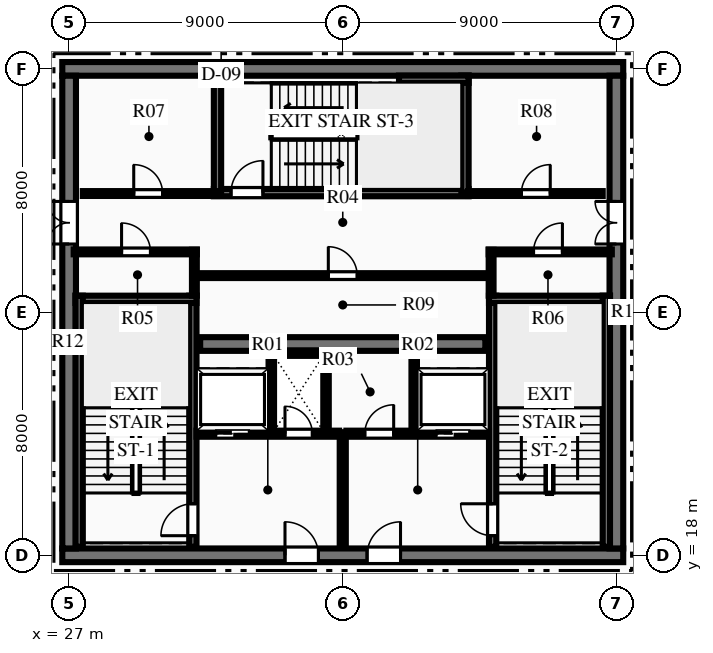
"""IFC4 building model, lengths in metres.
Left out: names, types, materials, properties, quantities, classifications, styles, units other than length and angle.
Written with IfcOpenShell. Run it as: python <this file> out.ifc"""

import sys

from ifc_helpers import new_model, si_unit, direction, frame, frame_2d, origin, place, context, subcontext, project, spatial, rectangle, extrude, element, fill, save


model = new_model("IFC4")
c1 = context("Model", 3, precision=1e-05, world=origin(), true_north=direction((0.0, 1.0)))
c2 = subcontext(c1, "Body", "Model", "MODEL_VIEW")
j1 = project(units=[si_unit("LENGTHUNIT", "METRE"), si_unit("PLANEANGLEUNIT", "RADIAN")], contexts=[c1])
p1 = place(None, origin())
s1 = spatial("IfcSite", under=j1, at=p1, CompositionType="ELEMENT")
p2 = place(p1, origin())
s2 = spatial("IfcBuilding", under=s1, at=p2, CompositionType="ELEMENT")
p3 = place(p2, frame((0.0, 0.0, 360.6)))
s3 = spatial("IfcBuildingStorey", under=s2, at=p3, CompositionType="ELEMENT", Elevation=360.6)
p4 = place(p3, frame((26.775, 18.0, 0.0), z_axis=(0.0, 0.0, 1.0), x_axis=(1.0, 0.0, 0.0)))
e1 = element("IfcWall", 1, at=p4, inside=s3, PredefinedType="SHEAR", context=c2, shape_type="SweptSolid", body=[
    extrude(rectangle(XDim=18.45, YDim=0.45, at=frame_2d((9.225, 0.0))), origin(), (0.0, 0.0, 1.0), 3.6),
])
p5 = place(p4, frame((7.325, 0.0, 0.0)))
e2 = element("IfcOpeningElement", 2, at=p5, cuts=e1, PredefinedType="OPENING", context=c2, shape_type="SweptSolid", body=[
    extrude(rectangle(XDim=1.1, YDim=2.15, at=frame_2d((0.55, 1.075))), frame((0.0, 0.235, 0.0), z_axis=(0.0, -1.0, 0.0), x_axis=(1.0, 0.0, 0.0)), (0.0, 0.0, 1.0), 0.47),
])
p6 = place(p4, frame((10.025, 0.0, 0.0)))
e3 = element("IfcOpeningElement", 3, at=p6, cuts=e1, PredefinedType="OPENING", context=c2, shape_type="SweptSolid", body=[
    extrude(rectangle(XDim=1.1, YDim=2.15, at=frame_2d((0.55, 1.075))), frame((0.0, 0.235, 0.0), z_axis=(0.0, -1.0, 0.0), x_axis=(1.0, 0.0, 0.0)), (0.0, 0.0, 1.0), 0.47),
])
p7 = place(p3, frame((26.775, 34.0, 0.0), z_axis=(0.0, 0.0, 1.0), x_axis=(1.0, 0.0, 0.0)))
e4 = element("IfcWall", 4, at=p7, inside=s3, PredefinedType="SHEAR", context=c2, shape_type="SweptSolid", body=[
    extrude(rectangle(XDim=18.45, YDim=0.45, at=frame_2d((9.225, 0.0))), origin(), (0.0, 0.0, 1.0), 3.6),
])
p8 = place(p3, frame((27.0, 18.225, 0.0), z_axis=(0.0, 0.0, 1.0), x_axis=(0.0, 1.0, 0.0)))
e5 = element("IfcWall", 5, at=p8, inside=s3, PredefinedType="SHEAR", context=c2, shape_type="SweptSolid", body=[
    extrude(rectangle(XDim=15.55, YDim=0.45, at=frame_2d((7.775, 0.0))), origin(), (0.0, 0.0, 1.0), 3.6),
])
p9 = place(p8, frame((10.015, 0.0, 0.0)))
e6 = element("IfcOpeningElement", 6, at=p9, cuts=e5, PredefinedType="OPENING", context=c2, shape_type="SweptSolid", body=[
    extrude(rectangle(XDim=1.4, YDim=2.2, at=frame_2d((0.7, 1.1))), frame((0.0, 0.235, 0.0), z_axis=(0.0, -1.0, 0.0), x_axis=(1.0, 0.0, 0.0)), (0.0, 0.0, 1.0), 0.47),
])
p10 = place(p3, frame((45.0, 18.225, 0.0), z_axis=(0.0, 0.0, 1.0), x_axis=(0.0, 1.0, 0.0)))
e7 = element("IfcWall", 7, at=p10, inside=s3, PredefinedType="SHEAR", context=c2, shape_type="SweptSolid", body=[
    extrude(rectangle(XDim=15.55, YDim=0.45, at=frame_2d((7.775, 0.0))), origin(), (0.0, 0.0, 1.0), 3.6),
])
p11 = place(p10, frame((10.015, 0.0, 0.0)))
e8 = element("IfcOpeningElement", 8, at=p11, cuts=e7, PredefinedType="OPENING", context=c2, shape_type="SweptSolid", body=[
    extrude(rectangle(XDim=1.4, YDim=2.2, at=frame_2d((0.7, 1.1))), frame((0.0, 0.235, 0.0), z_axis=(0.0, -1.0, 0.0), x_axis=(1.0, 0.0, 0.0)), (0.0, 0.0, 1.0), 0.47),
])
p12 = place(p3, frame((31.31, 24.95, 0.0), z_axis=(0.0, 0.0, 1.0), x_axis=(1.0, 0.0, 0.0)))
e9 = element("IfcWall", 9, at=p12, inside=s3, PredefinedType="SHEAR", context=c2, shape_type="SweptSolid", body=[
    extrude(rectangle(XDim=9.38, YDim=0.45, at=frame_2d((4.69, 0.0))), origin(), (0.0, 0.0, 1.0), 3.6),
])
p13 = place(p3, frame((31.07, 18.28, 0.0), z_axis=(0.0, 0.0, 1.0), x_axis=(0.0, 1.0, 0.0)))
e10 = element("IfcWall", 10, at=p13, inside=s3, PredefinedType="SHEAR", context=c2, shape_type="SweptSolid", body=[
    extrude(rectangle(XDim=8.26, YDim=0.24, at=frame_2d((4.13, 0.0))), origin(), (0.0, 0.0, 1.0), 3.6),
])
p14 = place(p13, frame((0.365, 0.0, 0.0)))
e11 = element("IfcOpeningElement", 11, at=p14, cuts=e10, PredefinedType="OPENING", context=c2, shape_type="SweptSolid", body=[
    extrude(rectangle(XDim=1.05, YDim=2.15, at=frame_2d((0.525, 1.075))), frame((0.0, 0.13, 0.0), z_axis=(0.0, -1.0, 0.0), x_axis=(1.0, 0.0, 0.0)), (0.0, 0.0, 1.0), 0.26),
])
p15 = place(p3, frame((27.21, 26.42, 0.0), z_axis=(0.0, 0.0, 1.0), x_axis=(1.0, 0.0, 0.0)))
e12 = element("IfcWall", 12, at=p15, inside=s3, PredefinedType="SHEAR", context=c2, shape_type="SweptSolid", body=[
    extrude(rectangle(XDim=3.98, YDim=0.24, at=frame_2d((1.99, 0.0))), origin(), (0.0, 0.0, 1.0), 3.6),
])
p16 = place(p3, frame((27.33, 18.28, 0.0), z_axis=(0.0, 0.0, 1.0), x_axis=(0.0, 1.0, 0.0)))
e13 = element("IfcWall", 13, at=p16, inside=s3, PredefinedType="SHEAR", context=c2, shape_type="SweptSolid", body=[
    extrude(rectangle(XDim=8.26, YDim=0.24, at=frame_2d((4.13, 0.0))), origin(), (0.0, 0.0, 1.0), 3.6),
])
p17 = place(p3, frame((40.93, 18.28, 0.0), z_axis=(0.0, 0.0, 1.0), x_axis=(0.0, 1.0, 0.0)))
e14 = element("IfcWall", 14, at=p17, inside=s3, PredefinedType="SHEAR", context=c2, shape_type="SweptSolid", body=[
    extrude(rectangle(XDim=8.26, YDim=0.24, at=frame_2d((4.13, 0.0))), origin(), (0.0, 0.0, 1.0), 3.6),
])
p18 = place(p17, frame((0.365, 0.0, 0.0)))
e15 = element("IfcOpeningElement", 15, at=p18, cuts=e14, PredefinedType="OPENING", context=c2, shape_type="SweptSolid", body=[
    extrude(rectangle(XDim=1.05, YDim=2.15, at=frame_2d((0.525, 1.075))), frame((0.0, 0.13, 0.0), z_axis=(0.0, -1.0, 0.0), x_axis=(1.0, 0.0, 0.0)), (0.0, 0.0, 1.0), 0.26),
])
p19 = place(p3, frame((40.81, 26.42, 0.0), z_axis=(0.0, 0.0, 1.0), x_axis=(1.0, 0.0, 0.0)))
e16 = element("IfcWall", 16, at=p19, inside=s3, PredefinedType="SHEAR", context=c2, shape_type="SweptSolid", body=[
    extrude(rectangle(XDim=3.98, YDim=0.24, at=frame_2d((1.99, 0.0))), origin(), (0.0, 0.0, 1.0), 3.6),
])
p20 = place(p3, frame((44.67, 18.28, 0.0), z_axis=(0.0, 0.0, 1.0), x_axis=(0.0, 1.0, 0.0)))
e17 = element("IfcWall", 17, at=p20, inside=s3, PredefinedType="SHEAR", context=c2, shape_type="SweptSolid", body=[
    extrude(rectangle(XDim=8.26, YDim=0.24, at=frame_2d((4.13, 0.0))), origin(), (0.0, 0.0, 1.0), 3.6),
])
p21 = place(p3, frame((31.76, 29.93, 0.0), z_axis=(0.0, 0.0, 1.0), x_axis=(1.0, 0.0, 0.0)))
e18 = element("IfcWall", 18, at=p21, inside=s3, PredefinedType="SHEAR", context=c2, shape_type="SweptSolid", body=[
    extrude(rectangle(XDim=8.38, YDim=0.24, at=frame_2d((4.19, 0.0))), origin(), (0.0, 0.0, 1.0), 3.6),
])
p22 = place(p21, frame((0.565, 0.0, 0.0)))
e19 = element("IfcOpeningElement", 19, at=p22, cuts=e18, PredefinedType="OPENING", context=c2, shape_type="SweptSolid", body=[
    extrude(rectangle(XDim=1.05, YDim=2.15, at=frame_2d((0.525, 1.075))), frame((0.0, 0.13, 0.0), z_axis=(0.0, -1.0, 0.0), x_axis=(1.0, 0.0, 0.0)), (0.0, 0.0, 1.0), 0.26),
])
p23 = place(p3, frame((31.88, 29.93, 0.0), z_axis=(0.0, 0.0, 1.0), x_axis=(0.0, 1.0, 0.0)))
e20 = element("IfcWall", 20, at=p23, inside=s3, PredefinedType="SHEAR", context=c2, shape_type="SweptSolid", body=[
    extrude(rectangle(XDim=3.79, YDim=0.24, at=frame_2d((1.895, 0.0))), origin(), (0.0, 0.0, 1.0), 3.6),
])
p24 = place(p3, frame((40.02, 29.93, 0.0), z_axis=(0.0, 0.0, 1.0), x_axis=(0.0, 1.0, 0.0)))
e21 = element("IfcWall", 21, at=p24, inside=s3, PredefinedType="SHEAR", context=c2, shape_type="SweptSolid", body=[
    extrude(rectangle(XDim=3.85, YDim=0.24, at=frame_2d((1.925, 0.0))), origin(), (0.0, 0.0, 1.0), 3.6),
])
p25 = place(p3, frame((37.85, 33.66, 0.0), z_axis=(0.0, 0.0, 1.0), x_axis=(1.0, 0.0, 0.0)))
e22 = element("IfcWall", 22, at=p25, inside=s3, PredefinedType="SHEAR", context=c2, shape_type="SweptSolid", body=[
    extrude(rectangle(XDim=2.29, YDim=0.24, at=frame_2d((1.145, 0.0))), origin(), (0.0, 0.0, 1.0), 3.6),
])
p26 = place(p3, frame((36.0, 18.28, 0.0), z_axis=(0.0, 0.0, 1.0), x_axis=(0.0, 1.0, 0.0)))
e23 = element("IfcWall", 23, at=p26, inside=s3, PredefinedType="PARTITIONING", context=c2, shape_type="SweptSolid", body=[
    extrude(rectangle(XDim=3.77, YDim=0.2, at=frame_2d((1.885, 0.0))), origin(), (0.0, 0.0, 1.0), 3.33),
])
p27 = place(p3, frame((31.19, 22.0, 0.0), z_axis=(0.0, 0.0, 1.0), x_axis=(1.0, 0.0, 0.0)))
e24 = element("IfcWall", 24, at=p27, inside=s3, PredefinedType="PARTITIONING", context=c2, shape_type="SweptSolid", body=[
    extrude(rectangle(XDim=4.69, YDim=0.2, at=frame_2d((2.345, 0.0))), origin(), (0.0, 0.0, 1.0), 3.33),
])
p28 = place(p27, frame((2.91, 0.0, 0.0)))
e25 = element("IfcOpeningElement", 25, at=p28, cuts=e24, PredefinedType="OPENING", context=c2, shape_type="SweptSolid", body=[
    extrude(rectangle(XDim=0.9, YDim=2.15, at=frame_2d((0.45, 1.075))), frame((0.0, 0.11, 0.0), z_axis=(0.0, -1.0, 0.0), x_axis=(1.0, 0.0, 0.0)), (0.0, 0.0, 1.0), 0.22),
])
p29 = place(p27, frame((0.635, 0.0, 0.0)))
e26 = element("IfcOpeningElement", 26, at=p29, cuts=e24, PredefinedType="OPENING", context=c2, shape_type="SweptSolid", body=[
    extrude(rectangle(XDim=1.1, YDim=2.15, at=frame_2d((0.55, 1.075))), frame((0.0, 0.11, 0.0), z_axis=(0.0, -1.0, 0.0), x_axis=(1.0, 0.0, 0.0)), (0.0, 0.0, 1.0), 0.22),
])
p30 = place(p3, frame((36.12, 22.0, 0.0), z_axis=(0.0, 0.0, 1.0), x_axis=(1.0, 0.0, 0.0)))
e27 = element("IfcWall", 27, at=p30, inside=s3, PredefinedType="PARTITIONING", context=c2, shape_type="SweptSolid", body=[
    extrude(rectangle(XDim=4.69, YDim=0.2, at=frame_2d((2.345, 0.0))), origin(), (0.0, 0.0, 1.0), 3.33),
])
p31 = place(p30, frame((0.605, 0.0, 0.0)))
e28 = element("IfcOpeningElement", 28, at=p31, cuts=e27, PredefinedType="OPENING", context=c2, shape_type="SweptSolid", body=[
    extrude(rectangle(XDim=0.95, YDim=2.15, at=frame_2d((0.475, 1.075))), frame((0.0, 0.11, 0.0), z_axis=(0.0, -1.0, 0.0), x_axis=(1.0, 0.0, 0.0)), (0.0, 0.0, 1.0), 0.22),
])
p32 = place(p30, frame((2.955, 0.0, 0.0)))
e29 = element("IfcOpeningElement", 29, at=p32, cuts=e27, PredefinedType="OPENING", context=c2, shape_type="SweptSolid", body=[
    extrude(rectangle(XDim=1.1, YDim=2.15, at=frame_2d((0.55, 1.075))), frame((0.0, 0.11, 0.0), z_axis=(0.0, -1.0, 0.0), x_axis=(1.0, 0.0, 0.0)), (0.0, 0.0, 1.0), 0.22),
])
for number, where, z_axis, x_axis in (
    (30, (33.65, 22.05, 0.0), (0.0, 0.0, 1.0), (0.0, 1.0, 0.0)),
    (31, (35.45, 22.05, 0.0), (0.0, 0.0, 1.0), (0.0, 1.0, 0.0)),
):
    element("IfcWall", number, at=place(p3, frame(where, z_axis=z_axis, x_axis=x_axis)), inside=s3, PredefinedType="PARTITIONING", context=c2, shape_type="SweptSolid", body=[
        extrude(rectangle(XDim=2.6, YDim=0.18, at=frame_2d((1.3, 0.0))), origin(), (0.0, 0.0, 1.0), 3.33),
    ])
p33 = place(p3, frame((33.65, 24.65, 0.0), z_axis=(0.0, 0.0, 1.0), x_axis=(1.0, 0.0, 0.0)))
e32 = element("IfcWall", 32, at=p33, inside=s3, PredefinedType="PARTITIONING", context=c2, shape_type="SweptSolid", body=[
    extrude(rectangle(XDim=1.8, YDim=0.18, at=frame_2d((0.9, 0.0))), origin(), (0.0, 0.0, 1.0), 3.33),
])
p34 = place(p3, frame((38.35, 22.05, 0.0), z_axis=(0.0, 0.0, 1.0), x_axis=(0.0, 1.0, 0.0)))
e33 = element("IfcWall", 33, at=p34, inside=s3, PredefinedType="PARTITIONING", context=c2, shape_type="SweptSolid", body=[
    extrude(rectangle(XDim=2.6, YDim=0.18, at=frame_2d((1.3, 0.0))), origin(), (0.0, 0.0, 1.0), 3.33),
])
p35 = place(p3, frame((27.15, 27.98, 0.0), z_axis=(0.0, 0.0, 1.0), x_axis=(1.0, 0.0, 0.0)))
e34 = element("IfcWall", 34, at=p35, inside=s3, PredefinedType="PARTITIONING", context=c2, shape_type="SweptSolid", body=[
    extrude(rectangle(XDim=4.05, YDim=0.16, at=frame_2d((2.025, 0.0))), origin(), (0.0, 0.0, 1.0), 3.33),
])
p36 = place(p35, frame((1.575, 0.0, 0.0)))
e35 = element("IfcOpeningElement", 35, at=p36, cuts=e34, PredefinedType="OPENING", context=c2, shape_type="SweptSolid", body=[
    extrude(rectangle(XDim=0.95, YDim=2.15, at=frame_2d((0.475, 1.075))), frame((0.0, 0.09, 0.0), z_axis=(0.0, -1.0, 0.0), x_axis=(1.0, 0.0, 0.0)), (0.0, 0.0, 1.0), 0.18),
])
p37 = place(p3, frame((31.12, 26.54, 0.0), z_axis=(0.0, 0.0, 1.0), x_axis=(0.0, 1.0, 0.0)))
e36 = element("IfcWall", 36, at=p37, inside=s3, PredefinedType="PARTITIONING", context=c2, shape_type="SweptSolid", body=[
    extrude(rectangle(XDim=1.51, YDim=0.16, at=frame_2d((0.755, 0.0))), origin(), (0.0, 0.0, 1.0), 3.33),
])
p38 = place(p3, frame((40.8, 27.98, 0.0), z_axis=(0.0, 0.0, 1.0), x_axis=(1.0, 0.0, 0.0)))
e37 = element("IfcWall", 37, at=p38, inside=s3, PredefinedType="PARTITIONING", context=c2, shape_type="SweptSolid", body=[
    extrude(rectangle(XDim=4.05, YDim=0.16, at=frame_2d((2.025, 0.0))), origin(), (0.0, 0.0, 1.0), 3.33),
])
p39 = place(p38, frame((1.475, 0.0, 0.0)))
e38 = element("IfcOpeningElement", 38, at=p39, cuts=e37, PredefinedType="OPENING", context=c2, shape_type="SweptSolid", body=[
    extrude(rectangle(XDim=0.95, YDim=2.15, at=frame_2d((0.475, 1.075))), frame((0.0, 0.09, 0.0), z_axis=(0.0, -1.0, 0.0), x_axis=(1.0, 0.0, 0.0)), (0.0, 0.0, 1.0), 0.18),
])
p40 = place(p3, frame((40.88, 26.54, 0.0), z_axis=(0.0, 0.0, 1.0), x_axis=(0.0, 1.0, 0.0)))
e39 = element("IfcWall", 39, at=p40, inside=s3, PredefinedType="PARTITIONING", context=c2, shape_type="SweptSolid", body=[
    extrude(rectangle(XDim=1.51, YDim=0.16, at=frame_2d((0.755, 0.0))), origin(), (0.0, 0.0, 1.0), 3.33),
])
p41 = place(p3, frame((27.45, 29.9, 0.0), z_axis=(0.0, 0.0, 1.0), x_axis=(1.0, 0.0, 0.0)))
e40 = element("IfcWall", 40, at=p41, inside=s3, PredefinedType="PARTITIONING", context=c2, shape_type="SweptSolid", body=[
    extrude(rectangle(XDim=4.43, YDim=0.16, at=frame_2d((2.215, 0.0))), origin(), (0.0, 0.0, 1.0), 3.33),
])
p42 = place(p41, frame((1.675, 0.0, 0.0)))
e41 = element("IfcOpeningElement", 41, at=p42, cuts=e40, PredefinedType="OPENING", context=c2, shape_type="SweptSolid", body=[
    extrude(rectangle(XDim=0.95, YDim=2.15, at=frame_2d((0.475, 1.075))), frame((0.0, 0.09, 0.0), z_axis=(0.0, -1.0, 0.0), x_axis=(1.0, 0.0, 0.0)), (0.0, 0.0, 1.0), 0.18),
])
p43 = place(p3, frame((40.12, 29.9, 0.0), z_axis=(0.0, 0.0, 1.0), x_axis=(1.0, 0.0, 0.0)))
e42 = element("IfcWall", 42, at=p43, inside=s3, PredefinedType="PARTITIONING", context=c2, shape_type="SweptSolid", body=[
    extrude(rectangle(XDim=4.43, YDim=0.16, at=frame_2d((2.215, 0.0))), origin(), (0.0, 0.0, 1.0), 3.33),
])
p44 = place(p43, frame((1.755, 0.0, 0.0)))
e43 = element("IfcOpeningElement", 43, at=p44, cuts=e42, PredefinedType="OPENING", context=c2, shape_type="SweptSolid", body=[
    extrude(rectangle(XDim=0.95, YDim=2.15, at=frame_2d((0.475, 1.075))), frame((0.0, 0.09, 0.0), z_axis=(0.0, -1.0, 0.0), x_axis=(1.0, 0.0, 0.0)), (0.0, 0.0, 1.0), 0.18),
])
p45 = place(p3, frame((31.2, 27.2, 0.0), z_axis=(0.0, 0.0, 1.0), x_axis=(1.0, 0.0, 0.0)))
e44 = element("IfcWall", 44, at=p45, inside=s3, PredefinedType="PARTITIONING", context=c2, shape_type="SweptSolid", body=[
    extrude(rectangle(XDim=9.6, YDim=0.16, at=frame_2d((4.8, 0.0))), origin(), (0.0, 0.0, 1.0), 3.33),
])
p46 = place(p45, frame((4.325, 0.0, 0.0)))
e45 = element("IfcOpeningElement", 45, at=p46, cuts=e44, PredefinedType="OPENING", context=c2, shape_type="SweptSolid", body=[
    extrude(rectangle(XDim=0.95, YDim=2.15, at=frame_2d((0.475, 1.075))), frame((0.0, 0.09, 0.0), z_axis=(0.0, -1.0, 0.0), x_axis=(1.0, 0.0, 0.0)), (0.0, 0.0, 1.0), 0.18),
])
p47 = place(p31, origin())
e46 = element("IfcDoor", 46, at=p47, inside=s3, OperationType="SINGLE_SWING_RIGHT", PredefinedType="DOOR", context=c2, shape_type="SweptSolid", body=[
    extrude(rectangle(XDim=0.95, YDim=2.15, at=frame_2d((0.475, 1.075))), frame((0.0, 0.025, 0.0), z_axis=(0.0, -1.0, 0.0), x_axis=(1.0, 0.0, 0.0)), (0.0, 0.0, 1.0), 0.05),
])
fill(e28, e46)
p48 = place(p36, origin())
e47 = element("IfcDoor", 47, at=p48, inside=s3, OperationType="SINGLE_SWING_LEFT", PredefinedType="DOOR", context=c2, shape_type="SweptSolid", body=[
    extrude(rectangle(XDim=0.95, YDim=2.15, at=frame_2d((0.475, 1.075))), frame((0.0, 0.025, 0.0), z_axis=(0.0, -1.0, 0.0), x_axis=(1.0, 0.0, 0.0)), (0.0, 0.0, 1.0), 0.05),
])
fill(e35, e47)
p49 = place(p39, origin())
e48 = element("IfcDoor", 48, at=p49, inside=s3, OperationType="SINGLE_SWING_RIGHT", PredefinedType="DOOR", context=c2, shape_type="SweptSolid", body=[
    extrude(rectangle(XDim=0.95, YDim=2.15, at=frame_2d((0.475, 1.075))), frame((0.0, 0.025, 0.0), z_axis=(0.0, -1.0, 0.0), x_axis=(1.0, 0.0, 0.0)), (0.0, 0.0, 1.0), 0.05),
])
fill(e38, e48)
p50 = place(p42, origin())
e49 = element("IfcDoor", 49, at=p50, inside=s3, OperationType="SINGLE_SWING_LEFT", PredefinedType="DOOR", context=c2, shape_type="SweptSolid", body=[
    extrude(rectangle(XDim=0.95, YDim=2.15, at=frame_2d((0.475, 1.075))), frame((0.0, 0.025, 0.0), z_axis=(0.0, -1.0, 0.0), x_axis=(1.0, 0.0, 0.0)), (0.0, 0.0, 1.0), 0.05),
])
fill(e41, e49)
p51 = place(p44, origin())
e50 = element("IfcDoor", 50, at=p51, inside=s3, OperationType="SINGLE_SWING_RIGHT", PredefinedType="DOOR", context=c2, shape_type="SweptSolid", body=[
    extrude(rectangle(XDim=0.95, YDim=2.15, at=frame_2d((0.475, 1.075))), frame((0.0, 0.025, 0.0), z_axis=(0.0, -1.0, 0.0), x_axis=(1.0, 0.0, 0.0)), (0.0, 0.0, 1.0), 0.05),
])
fill(e43, e50)
p52 = place(p46, origin())
e51 = element("IfcDoor", 51, at=p52, inside=s3, OperationType="SINGLE_SWING_LEFT", PredefinedType="DOOR", context=c2, shape_type="SweptSolid", body=[
    extrude(rectangle(XDim=0.95, YDim=2.15, at=frame_2d((0.475, 1.075))), frame((0.0, 0.025, 0.0), z_axis=(0.0, -1.0, 0.0), x_axis=(1.0, 0.0, 0.0)), (0.0, 0.0, 1.0), 0.05),
])
fill(e45, e51)
p53 = place(p14, origin())
e52 = element("IfcDoor", 52, at=p53, inside=s3, OperationType="SINGLE_SWING_LEFT", PredefinedType="DOOR", context=c2, shape_type="SweptSolid", body=[
    extrude(rectangle(XDim=1.05, YDim=2.15, at=frame_2d((0.525, 1.075))), frame((0.0, 0.025, 0.0), z_axis=(0.0, -1.0, 0.0), x_axis=(1.0, 0.0, 0.0)), (0.0, 0.0, 1.0), 0.05),
])
fill(e11, e52)
p54 = place(p18, origin())
e53 = element("IfcDoor", 53, at=p54, inside=s3, OperationType="SINGLE_SWING_RIGHT", PredefinedType="DOOR", context=c2, shape_type="SweptSolid", body=[
    extrude(rectangle(XDim=1.05, YDim=2.15, at=frame_2d((0.525, 1.075))), frame((0.0, 0.025, 0.0), z_axis=(0.0, -1.0, 0.0), x_axis=(1.0, 0.0, 0.0)), (0.0, 0.0, 1.0), 0.05),
])
fill(e15, e53)
p55 = place(p22, origin())
e54 = element("IfcDoor", 54, at=p55, inside=s3, OperationType="SINGLE_SWING_RIGHT", PredefinedType="DOOR", context=c2, shape_type="SweptSolid", body=[
    extrude(rectangle(XDim=1.05, YDim=2.15, at=frame_2d((0.525, 1.075))), frame((0.0, 0.025, 0.0), z_axis=(0.0, -1.0, 0.0), x_axis=(1.0, 0.0, 0.0)), (0.0, 0.0, 1.0), 0.05),
])
fill(e19, e54)
p56 = place(p5, origin())
e55 = element("IfcDoor", 55, at=p56, inside=s3, OperationType="SINGLE_SWING_LEFT", PredefinedType="DOOR", context=c2, shape_type="SweptSolid", body=[
    extrude(rectangle(XDim=1.1, YDim=2.15, at=frame_2d((0.55, 1.075))), frame((0.0, 0.025, 0.0), z_axis=(0.0, -1.0, 0.0), x_axis=(1.0, 0.0, 0.0)), (0.0, 0.0, 1.0), 0.05),
])
fill(e2, e55)
p57 = place(p6, origin())
e56 = element("IfcDoor", 56, at=p57, inside=s3, OperationType="SINGLE_SWING_RIGHT", PredefinedType="DOOR", context=c2, shape_type="SweptSolid", body=[
    extrude(rectangle(XDim=1.1, YDim=2.15, at=frame_2d((0.55, 1.075))), frame((0.0, 0.025, 0.0), z_axis=(0.0, -1.0, 0.0), x_axis=(1.0, 0.0, 0.0)), (0.0, 0.0, 1.0), 0.05),
])
fill(e3, e56)
p58 = place(p28, origin())
e57 = element("IfcDoor", 57, at=p58, inside=s3, OperationType="SINGLE_SWING_LEFT", PredefinedType="DOOR", context=c2, shape_type="SweptSolid", body=[
    extrude(rectangle(XDim=0.9, YDim=2.15, at=frame_2d((0.45, 1.075))), frame((0.0, 0.025, 0.0), z_axis=(0.0, -1.0, 0.0), x_axis=(1.0, 0.0, 0.0)), (0.0, 0.0, 1.0), 0.05),
])
fill(e25, e57)
p59 = place(p9, origin())
e58 = element("IfcDoor", 58, at=p59, inside=s3, OperationType="DOUBLE_DOOR_SINGLE_SWING", PredefinedType="DOOR", context=c2, shape_type="SweptSolid", body=[
    extrude(rectangle(XDim=1.4, YDim=2.2, at=frame_2d((0.7, 1.1))), frame((0.0, 0.025, 0.0), z_axis=(0.0, -1.0, 0.0), x_axis=(1.0, 0.0, 0.0)), (0.0, 0.0, 1.0), 0.05),
])
fill(e6, e58)
p60 = place(p11, origin())
e59 = element("IfcDoor", 59, at=p60, inside=s3, OperationType="DOUBLE_DOOR_SINGLE_SWING", PredefinedType="DOOR", context=c2, shape_type="SweptSolid", body=[
    extrude(rectangle(XDim=1.4, YDim=2.2, at=frame_2d((0.7, 1.1))), frame((0.0, 0.025, 0.0), z_axis=(0.0, -1.0, 0.0), x_axis=(1.0, 0.0, 0.0)), (0.0, 0.0, 1.0), 0.05),
])
fill(e8, e59)
p61 = place(p29, origin())
e60 = element("IfcDoor", 60, at=p61, inside=s3, OperationType="SLIDING_TO_LEFT", PredefinedType="DOOR", context=c2, shape_type="SweptSolid", body=[
    extrude(rectangle(XDim=1.1, YDim=2.15, at=frame_2d((0.55, 1.075))), frame((0.0, 0.025, 0.0), z_axis=(0.0, -1.0, 0.0), x_axis=(1.0, 0.0, 0.0)), (0.0, 0.0, 1.0), 0.05),
])
fill(e26, e60)
p62 = place(p32, origin())
e61 = element("IfcDoor", 61, at=p62, inside=s3, OperationType="SLIDING_TO_LEFT", PredefinedType="DOOR", context=c2, shape_type="SweptSolid", body=[
    extrude(rectangle(XDim=1.1, YDim=2.15, at=frame_2d((0.55, 1.075))), frame((0.0, 0.025, 0.0), z_axis=(0.0, -1.0, 0.0), x_axis=(1.0, 0.0, 0.0)), (0.0, 0.0, 1.0), 0.05),
])
fill(e29, e61)
save(model, sys.argv[1])
